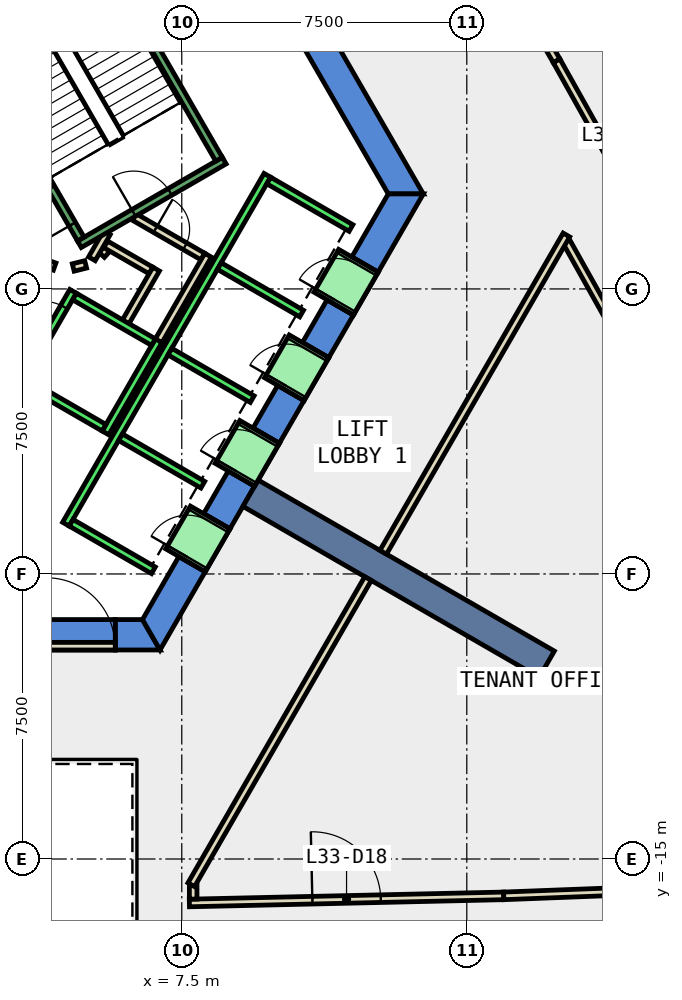
"""IFC4 building model, lengths in metres.
Left out: names, types, materials, properties, quantities, classifications, styles, units other than length and angle.
Written with IfcOpenShell. Run it as: python <this file> out.ifc"""

import sys

from ifc_helpers import new_model, si_unit, direction, frame, frame_2d, origin, place, context, subcontext, project, spatial, polyline, rectangle, outline, extrude, element, fill, save


model = new_model("IFC4")
c1 = context("Model", 3, precision=1e-05, world=origin(), true_north=direction((0.0, 1.0)))
c2 = subcontext(c1, "Body", "Model", "MODEL_VIEW")
j1 = project(units=[si_unit("LENGTHUNIT", "METRE"), si_unit("PLANEANGLEUNIT", "RADIAN")], contexts=[c1])
p1 = place(None, origin())
s1 = spatial("IfcSite", under=j1, at=p1, CompositionType="ELEMENT")
p2 = place(p1, origin())
s2 = spatial("IfcBuilding", under=s1, at=p2, CompositionType="ELEMENT")
p3 = place(p2, frame((0.0, 0.0, 150.8)))
s3 = spatial("IfcBuildingStorey", under=s2, at=p3, CompositionType="ELEMENT", Elevation=150.8)
p4 = place(p3, frame((0.0, 0.0, -0.4)))
e1 = element("IfcWall", 1, at=p4, inside=s3, PredefinedType="SHEAR", context=c2, shape_type="SweptSolid", body=[
    extrude(outline(polyline([(8.517, 11.748), (7.824, 11.348), (12.933, 2.5), (13.856, 2.5), (8.517, 11.748)])), origin(), (0.0, 0.0, 1.0), 4.2),
])
p5 = place(p3, frame((0.0, 0.0, -0.4)))
e2 = element("IfcWall", 2, at=p5, inside=s3, PredefinedType="SHEAR", context=c2, shape_type="SweptSolid", body=[
    extrude(outline(polyline([(5.75, -8.7), (5.75, -9.5), (6.928, -9.5), (6.466, -8.7), (5.75, -8.7)])), origin(), (0.0, 0.0, 1.0), 4.2),
])
p6 = place(p3, frame((0.0, 0.0, 3.6)))
e3 = element("IfcWall", 3, at=p6, inside=s3, PredefinedType="SHEAR", context=c2, shape_type="SweptSolid", body=[
    extrude(outline(polyline([(5.75, -9.5), (5.75, -8.7), (3.75, -8.7), (3.75, -9.5), (5.75, -9.5)])), origin(), (0.0, 0.0, 1.0), 0.2),
])
p7 = place(p3, frame((0.0, 0.0, -0.4)))
e4 = element("IfcWall", 4, at=p7, inside=s3, PredefinedType="SHEAR", context=c2, shape_type="SweptSolid", body=[
    extrude(outline(polyline([(8.117, -7.44), (7.424, -7.04), (6.466, -8.7), (6.928, -9.5), (8.117, -7.44)])), origin(), (0.0, 0.0, 1.0), 4.2),
])
p8 = place(p3, frame((0.0, 0.0, -0.4)))
e5 = element("IfcWall", 5, at=p8, inside=s3, PredefinedType="SHEAR", context=c2, shape_type="SweptSolid", body=[
    extrude(outline(polyline([(9.417, -5.189), (8.724, -4.789), (8.075, -5.914), (8.767, -6.314), (9.417, -5.189)])), origin(), (0.0, 0.0, 1.0), 4.2),
])
p9 = place(p3, frame((0.0, 0.0, -0.4)))
e6 = element("IfcWall", 6, at=p9, inside=s3, PredefinedType="SHEAR", context=c2, shape_type="SweptSolid", body=[
    extrude(outline(polyline([(10.717, -2.937), (10.025, -2.537), (9.374, -3.663), (10.067, -4.063), (10.717, -2.937)])), origin(), (0.0, 0.0, 1.0), 4.2),
])
p10 = place(p3, frame((0.0, 0.0, -0.4)))
e7 = element("IfcWall", 7, at=p10, inside=s3, PredefinedType="SHEAR", context=c2, shape_type="SweptSolid", body=[
    extrude(outline(polyline([(12.017, -0.686), (11.324, -0.286), (10.675, -1.411), (11.367, -1.811), (12.017, -0.686)])), origin(), (0.0, 0.0, 1.0), 4.2),
])
p11 = place(p3, frame((0.0, 0.0, -0.4)))
e8 = element("IfcWall", 8, at=p11, inside=s3, PredefinedType="SHEAR", context=c2, shape_type="SweptSolid", body=[
    extrude(outline(polyline([(11.974, 0.84), (12.667, 0.44), (13.856, 2.5), (12.933, 2.5), (11.974, 0.84)])), origin(), (0.0, 0.0, 1.0), 4.2),
])
p12 = place(p3, frame((0.0, 0.0, 3.6)))
e9 = element("IfcWall", 9, at=p12, inside=s3, PredefinedType="SHEAR", context=c2, shape_type="SweptSolid", body=[
    extrude(outline(polyline([(8.767, -6.314), (8.075, -5.914), (7.424, -7.04), (8.117, -7.44), (8.767, -6.314)])), origin(), (0.0, 0.0, 1.0), 0.2),
])
p13 = place(p3, frame((0.0, 0.0, 3.6)))
e10 = element("IfcWall", 10, at=p13, inside=s3, PredefinedType="SHEAR", context=c2, shape_type="SweptSolid", body=[
    extrude(outline(polyline([(10.067, -4.063), (9.374, -3.663), (8.724, -4.789), (9.417, -5.189), (10.067, -4.063)])), origin(), (0.0, 0.0, 1.0), 0.2),
])
p14 = place(p3, frame((0.0, 0.0, 3.6)))
e11 = element("IfcWall", 11, at=p14, inside=s3, PredefinedType="SHEAR", context=c2, shape_type="SweptSolid", body=[
    extrude(outline(polyline([(11.367, -1.811), (10.675, -1.411), (10.025, -2.537), (10.717, -2.937), (11.367, -1.811)])), origin(), (0.0, 0.0, 1.0), 0.2),
])
p15 = place(p3, frame((0.0, 0.0, 3.6)))
e12 = element("IfcWall", 12, at=p15, inside=s3, PredefinedType="SHEAR", context=c2, shape_type="SweptSolid", body=[
    extrude(outline(polyline([(12.667, 0.44), (11.974, 0.84), (11.324, -0.286), (12.017, -0.686), (12.667, 0.44)])), origin(), (0.0, 0.0, 1.0), 0.2),
])
p16 = place(p3, frame((9.31, -5.375, -0.4), z_axis=(0.0, 0.0, 1.0), x_axis=(0.866017533419, -0.500013631625, 0.0)))
e13 = element("IfcWall", 13, at=p16, inside=s3, PredefinedType="SHEAR", context=c2, shape_type="SweptSolid", body=[
    extrude(rectangle(XDim=9.0, YDim=0.8, at=frame_2d((4.5, 0.0))), origin(), (0.0, 0.0, 1.0), 4.2),
])
p17 = place(p3, frame((7.7, -16.157, 0.0), z_axis=(0.0, 0.0, 1.0), x_axis=(0.999744539931, 0.022602098978, 0.0)))
e14 = element("IfcWall", 14, at=p17, inside=s3, PredefinedType="PARTITIONING", context=c2, shape_type="SweptSolid", body=[
    extrude(rectangle(XDim=8.274, YDim=0.2, at=frame_2d((4.137, 0.0))), origin(), (0.0, 0.0, 1.0), 3.8),
])
p18 = place(p17, frame((3.237, 0.0, 0.0)))
e15 = element("IfcOpeningElement", 15, at=p18, cuts=e14, PredefinedType="OPENING", context=c2, shape_type="SweptSolid", body=[
    extrude(rectangle(XDim=1.8, YDim=2.1, at=frame_2d((0.9, 1.05))), frame((0.0, 0.11, 0.0), z_axis=(0.0, -1.0, 0.0), x_axis=(1.0, 0.0, 0.0)), (0.0, 0.0, 1.0), 0.22),
])
p19 = place(p3, frame((15.972, -15.97, 0.0), z_axis=(0.0, 0.0, 1.0), x_axis=(0.999262695969, 0.038393546916, 0.0)))
e16 = element("IfcWall", 16, at=p19, inside=s3, PredefinedType="PARTITIONING", context=c2, shape_type="SweptSolid", body=[
    extrude(rectangle(XDim=7.344, YDim=0.2, at=frame_2d((3.672, 0.0))), origin(), (0.0, 0.0, 1.0), 3.8),
])
p20 = place(p3, frame((18.93, -1.095, 0.0), z_axis=(0.0, 0.0, 1.0), x_axis=(-0.488268004118, 0.872693735599, 0.0)))
e17 = element("IfcWall", 17, at=p20, inside=s3, PredefinedType="PARTITIONING", context=c2, shape_type="SweptSolid", body=[
    extrude(rectangle(XDim=2.683, YDim=0.2, at=frame_2d((1.341, 0.0))), origin(), (0.0, 0.0, 1.0), 3.8),
])
p21 = place(p3, frame((15.659, 8.954, 0.0), z_axis=(0.0, 0.0, 1.0), x_axis=(0.50001992892, -0.866013897511, 0.0)))
e18 = element("IfcWall", 18, at=p21, inside=s3, PredefinedType="PARTITIONING", context=c2, shape_type="SweptSolid", body=[
    extrude(rectangle(XDim=3.41, YDim=0.2, at=frame_2d((1.705, 0.0))), origin(), (0.0, 0.0, 1.0), 3.8),
])
p22 = place(p3, frame((17.364, 6.001, 0.0), z_axis=(0.0, 0.0, 1.0), x_axis=(0.488528981592, -0.872547668695, 0.0)))
e19 = element("IfcWall", 19, at=p22, inside=s3, PredefinedType="PARTITIONING", context=c2, shape_type="SweptSolid", body=[
    extrude(rectangle(XDim=6.896, YDim=0.2, at=frame_2d((3.448, 0.0))), origin(), (0.0, 0.0, 1.0), 3.8),
])
p23 = place(p22, frame((3.023, 0.0, 0.0)))
e20 = element("IfcOpeningElement", 20, at=p23, cuts=e19, PredefinedType="OPENING", context=c2, shape_type="SweptSolid", body=[
    extrude(rectangle(XDim=1.0, YDim=2.1, at=frame_2d((0.5, 1.05))), frame((0.0, 0.11, 0.0), z_axis=(0.0, -1.0, 0.0), x_axis=(1.0, 0.0, 0.0)), (0.0, 0.0, 1.0), 0.22),
])
p24 = place(p3, frame((5.39, 0.898, 0.0), z_axis=(0.0, 0.0, 1.0), x_axis=(0.673828488714, 0.738887791073, 0.0)))
e21 = element("IfcWall", 21, at=p24, inside=s3, PredefinedType="PARTITIONING", context=c2, shape_type="SweptSolid", body=[
    extrude(rectangle(XDim=0.263, YDim=0.2, at=frame_2d((0.131, 0.0))), origin(), (0.0, 0.0, 1.0), 3.8),
])
p25 = place(p3, frame((5.499, 1.172, 0.0), z_axis=(0.0, 0.0, 1.0), x_axis=(0.866333505267, -0.499465972466, 0.0)))
e22 = element("IfcWall", 22, at=p25, inside=s3, PredefinedType="PARTITIONING", context=c2, shape_type="SweptSolid", body=[
    extrude(rectangle(XDim=1.374, YDim=0.2, at=frame_2d((0.687, 0.0))), origin(), (0.0, 0.0, 1.0), 3.8),
])
p26 = place(p3, frame((6.826, 0.522, 0.0), z_axis=(0.0, 0.0, 1.0), x_axis=(-0.500016722714, -0.866015748706, 0.0)))
e23 = element("IfcWall", 23, at=p26, inside=s3, PredefinedType="PARTITIONING", context=c2, shape_type="SweptSolid", body=[
    extrude(rectangle(XDim=1.7, YDim=0.2, at=frame_2d((0.85, 0.0))), origin(), (0.0, 0.0, 1.0), 3.8),
])
p27 = place(p3, frame((6.25, 1.894, 0.0), z_axis=(0.0, 0.0, 1.0), x_axis=(0.866043184279, -0.499969202016, 0.0)))
e24 = element("IfcWall", 24, at=p27, inside=s3, PredefinedType="PARTITIONING", context=c2, shape_type="SweptSolid", body=[
    extrude(rectangle(XDim=2.084, YDim=0.2, at=frame_2d((1.042, 0.0))), origin(), (0.0, 0.0, 1.0), 3.8),
])
p28 = place(p27, frame((0.642, 0.0, 0.0)))
e25 = element("IfcOpeningElement", 25, at=p28, cuts=e24, PredefinedType="OPENING", context=c2, shape_type="SweptSolid", body=[
    extrude(rectangle(XDim=0.9, YDim=2.1, at=frame_2d((0.45, 1.05))), frame((0.0, 0.11, 0.0), z_axis=(0.0, -1.0, 0.0), x_axis=(1.0, 0.0, 0.0)), (0.0, 0.0, 1.0), 0.22),
])
p29 = place(p3, frame((8.192, 0.888, 0.0), z_axis=(0.0, 0.0, 1.0), x_axis=(-0.499940625693, -0.866059680843, 0.0)))
e26 = element("IfcWall", 26, at=p29, inside=s3, PredefinedType="PARTITIONING", context=c2, shape_type="SweptSolid", body=[
    extrude(rectangle(XDim=2.68, YDim=0.2, at=frame_2d((1.34, 0.0))), origin(), (0.0, 0.0, 1.0), 3.8),
])
p30 = place(p3, frame((5.135, 0.793, 0.0), z_axis=(0.0, 0.0, 1.0), x_axis=(0.499526442893, 0.866298639529, 0.0)))
e27 = element("IfcWall", 27, at=p30, inside=s3, PredefinedType="PARTITIONING", context=c2, shape_type="SweptSolid", body=[
    extrude(rectangle(XDim=0.791, YDim=0.2, at=frame_2d((0.396, 0.0))), origin(), (0.0, 0.0, 1.0), 3.8),
])
p31 = place(p3, frame((3.838, 0.702, 0.0), z_axis=(0.0, 0.0, 1.0), x_axis=(0.941035081519, -0.338308993895, 0.0)))
e28 = element("IfcWall", 28, at=p31, inside=s3, PredefinedType="PARTITIONING", context=c2, shape_type="SweptSolid", body=[
    extrude(rectangle(XDim=0.337, YDim=0.2, at=frame_2d((0.168, 0.0))), origin(), (0.0, 0.0, 1.0), 3.8),
])
p32 = place(p3, frame((4.644, 0.564, 0.0), z_axis=(0.0, 0.0, 1.0), x_axis=(0.969929076366, 0.243387729394, 0.0)))
e29 = element("IfcWall", 29, at=p32, inside=s3, PredefinedType="PARTITIONING", context=c2, shape_type="SweptSolid", body=[
    extrude(rectangle(XDim=0.337, YDim=0.2, at=frame_2d((0.168, 0.0))), origin(), (0.0, 0.0, 1.0), 3.8),
])
p33 = place(p3, frame((7.8, -15.69, 0.0), z_axis=(0.0, 0.0, 1.0), x_axis=(0.0, -1.0, 0.0)))
e30 = element("IfcWall", 30, at=p33, inside=s3, PredefinedType="PARTITIONING", context=c2, shape_type="SweptSolid", body=[
    extrude(rectangle(XDim=0.365, YDim=0.2, at=frame_2d((0.183, 0.0))), origin(), (0.0, 0.0, 1.0), 3.8),
])
p34 = place(p3, frame((17.621, 1.42, 0.0), z_axis=(0.0, 0.0, 1.0), x_axis=(-0.499987708133, -0.866032500381, 0.0)))
e31 = element("IfcWall", 31, at=p34, inside=s3, PredefinedType="PARTITIONING", context=c2, shape_type="SweptSolid", body=[
    extrude(rectangle(XDim=9.64, YDim=0.2, at=frame_2d((4.82, 0.0))), origin(), (0.0, 0.0, 1.0), 3.8),
])
p35 = place(p3, frame((3.75, -9.4, 0.0), z_axis=(0.0, 0.0, 1.0), x_axis=(1.0, 0.0, 0.0)))
e32 = element("IfcWall", 32, at=p35, inside=s3, PredefinedType="PARTITIONING", context=c2, shape_type="SweptSolid", body=[
    extrude(rectangle(XDim=2.0, YDim=0.2, at=frame_2d((1.0, 0.0))), origin(), (0.0, 0.0, 1.0), 2.4),
])
p36 = place(p35, frame((0.19, 0.0, 0.0)))
e33 = element("IfcOpeningElement", 33, at=p36, cuts=e32, PredefinedType="OPENING", context=c2, shape_type="SweptSolid", body=[
    extrude(rectangle(XDim=1.8, YDim=2.1, at=frame_2d((0.9, 1.05))), frame((0.0, 0.11, 0.0), z_axis=(0.0, -1.0, 0.0), x_axis=(1.0, 0.0, 0.0)), (0.0, 0.0, 1.0), 0.22),
])
p37 = place(p3, frame((12.401, -7.621, 0.0), z_axis=(0.0, 0.0, 1.0), x_axis=(-0.499983724212, -0.866034800411, 0.0)))
e34 = element("IfcWall", 34, at=p37, inside=s3, PredefinedType="PARTITIONING", context=c2, shape_type="SweptSolid", body=[
    extrude(rectangle(XDim=9.302, YDim=0.2, at=frame_2d((4.651, 0.0))), origin(), (0.0, 0.0, 1.0), 3.8),
])
p38 = place(p3, frame((3.24, -2.488, 0.0), z_axis=(0.0, 0.0, 1.0), x_axis=(0.49994636267, 0.866056369097, 0.0)))
e35 = element("IfcWall", 35, at=p38, inside=s3, PredefinedType="STANDARD", context=c2, shape_type="SweptSolid", body=[
    extrude(rectangle(XDim=2.8, YDim=0.2, at=frame_2d((1.4, 0.0))), origin(), (0.0, 0.0, 1.0), 3.8),
])
p39 = place(p38, frame((1.225, 0.0, 0.0)))
e36 = element("IfcOpeningElement", 36, at=p39, cuts=e35, PredefinedType="OPENING", context=c2, shape_type="SweptSolid", body=[
    extrude(rectangle(XDim=1.1, YDim=2.1, at=frame_2d((0.55, 1.05))), frame((0.0, 0.11, 0.0), z_axis=(0.0, -1.0, 0.0), x_axis=(1.0, 0.0, 0.0)), (0.0, 0.0, 1.0), 0.22),
])
p40 = place(p3, frame((5.492, -3.788, 0.0), z_axis=(0.0, 0.0, 1.0), x_axis=(0.500011755427, 0.866018616679, 0.0)))
e37 = element("IfcWall", 37, at=p40, inside=s3, PredefinedType="STANDARD", context=c2, shape_type="SweptSolid", body=[
    extrude(rectangle(XDim=2.8, YDim=0.2, at=frame_2d((1.4, 0.0))), origin(), (0.0, 0.0, 1.0), 3.8),
])
p41 = place(p3, frame((3.377, -2.452, 0.0), z_axis=(0.0, 0.0, 1.0), x_axis=(0.865955154139, -0.50012165622, 0.0)))
e38 = element("IfcWall", 38, at=p41, inside=s3, PredefinedType="STANDARD", context=c2, shape_type="SweptSolid", body=[
    extrude(rectangle(XDim=2.4, YDim=0.2, at=frame_2d((1.2, 0.0))), origin(), (0.0, 0.0, 1.0), 3.8),
])
p42 = place(p3, frame((4.677, -0.2, 0.0), z_axis=(0.0, 0.0, 1.0), x_axis=(0.865973769406, -0.500089422704, 0.0)))
e39 = element("IfcWall", 39, at=p42, inside=s3, PredefinedType="STANDARD", context=c2, shape_type="SweptSolid", body=[
    extrude(rectangle(XDim=2.399, YDim=0.2, at=frame_2d((1.2, 0.0))), origin(), (0.0, 0.0, 1.0), 3.8),
])
p43 = place(p3, frame((4.451, -6.19, 0.0), z_axis=(0.0, 0.0, 1.0), x_axis=(0.50000090737, 0.866024879913, 0.0)))
e40 = element("IfcWall", 40, at=p43, inside=s3, PredefinedType="STANDARD", context=c2, shape_type="SweptSolid", body=[
    extrude(rectangle(XDim=10.6, YDim=0.2, at=frame_2d((5.3, 0.0))), origin(), (0.0, 0.0, 1.0), 3.8),
])
for number, where, z_axis, x_axis in (
    (41, (4.588, -6.153, 0.0), (0.0, 0.0, 1.0), (0.866, -0.5, 0.0)),
    (42, (5.888, -3.902, 0.0), (0.0, 0.0, 1.0), (0.866, -0.5, 0.0)),
    (43, (7.188, -1.65, 0.0), (0.0, 0.0, 1.0), (0.866, -0.5, 0.0)),
    (44, (8.488, 0.602, 0.0), (0.0, 0.0, 1.0), (0.866, -0.5, 0.0)),
):
    element("IfcWall", number, at=place(p3, frame(where, z_axis=z_axis, x_axis=x_axis)), inside=s3, PredefinedType="STANDARD", context=c2, shape_type="SweptSolid", body=[
        extrude(rectangle(XDim=2.5, YDim=0.2, at=frame_2d((1.25, 0.0))), origin(), (0.0, 0.0, 1.0), 3.8),
    ])
p44 = place(p3, frame((9.788, 2.853, 0.0), z_axis=(0.0, 0.0, 1.0), x_axis=(0.865998541277, -0.500046524342, 0.0)))
e45 = element("IfcWall", 45, at=p44, inside=s3, PredefinedType="STANDARD", context=c2, shape_type="SweptSolid", body=[
    extrude(rectangle(XDim=2.5, YDim=0.2, at=frame_2d((1.25, 0.0))), origin(), (0.0, 0.0, 1.0), 3.8),
])
p45 = place(p3, frame((7.598, -7.14, 0.0), z_axis=(0.0, 0.0, 1.0), x_axis=(0.500362116554, 0.865816234728, 0.0)))
e46 = element("IfcWall", 46, at=p45, inside=s3, PredefinedType="STANDARD", context=c2, shape_type="SweptSolid", body=[
    extrude(rectangle(XDim=1.299, YDim=1.2, at=frame_2d((0.65, 0.0))), origin(), (0.0, 0.0, 1.0), 2.4),
])
p46 = place(p45, frame((0.1, 0.0, 0.0)))
e47 = element("IfcOpeningElement", 47, at=p46, cuts=e46, PredefinedType="OPENING", context=c2, shape_type="SweptSolid", body=[
    extrude(rectangle(XDim=1.1, YDim=2.3, at=frame_2d((0.55, 1.15))), frame((0.0, 0.61, 0.0), z_axis=(0.0, -1.0, 0.0), x_axis=(1.0, 0.0, 0.0)), (0.0, 0.0, 1.0), 1.22),
])
p47 = place(p3, frame((8.898, -4.889, 0.0), z_axis=(0.0, 0.0, 1.0), x_axis=(0.500036693733, 0.866004217611, 0.0)))
e48 = element("IfcWall", 48, at=p47, inside=s3, PredefinedType="STANDARD", context=c2, shape_type="SweptSolid", body=[
    extrude(rectangle(XDim=1.3, YDim=1.2, at=frame_2d((0.65, 0.0))), origin(), (0.0, 0.0, 1.0), 2.4),
])
p48 = place(p47, frame((0.1, 0.0, 0.0)))
e49 = element("IfcOpeningElement", 49, at=p48, cuts=e48, PredefinedType="OPENING", context=c2, shape_type="SweptSolid", body=[
    extrude(rectangle(XDim=1.1, YDim=2.3, at=frame_2d((0.55, 1.15))), frame((0.0, 0.61, 0.0), z_axis=(0.0, -1.0, 0.0), x_axis=(1.0, 0.0, 0.0)), (0.0, 0.0, 1.0), 1.22),
])
p49 = place(p3, frame((10.198, -2.637, 0.0), z_axis=(0.0, 0.0, 1.0), x_axis=(0.49989585183, 0.866085525409, 0.0)))
e50 = element("IfcWall", 50, at=p49, inside=s3, PredefinedType="STANDARD", context=c2, shape_type="SweptSolid", body=[
    extrude(rectangle(XDim=1.3, YDim=1.2, at=frame_2d((0.65, 0.0))), origin(), (0.0, 0.0, 1.0), 2.4),
])
p50 = place(p49, frame((0.1, 0.0, 0.0)))
e51 = element("IfcOpeningElement", 51, at=p50, cuts=e50, PredefinedType="OPENING", context=c2, shape_type="SweptSolid", body=[
    extrude(rectangle(XDim=1.1, YDim=2.3, at=frame_2d((0.55, 1.15))), frame((0.0, 0.61, 0.0), z_axis=(0.0, -1.0, 0.0), x_axis=(1.0, 0.0, 0.0)), (0.0, 0.0, 1.0), 1.22),
])
p51 = place(p3, frame((11.498, -0.385, 0.0), z_axis=(0.0, 0.0, 1.0), x_axis=(0.500221244143, 0.865897630733, 0.0)))
e52 = element("IfcWall", 52, at=p51, inside=s3, PredefinedType="STANDARD", context=c2, shape_type="SweptSolid", body=[
    extrude(rectangle(XDim=1.299, YDim=1.2, at=frame_2d((0.65, 0.0))), origin(), (0.0, 0.0, 1.0), 2.4),
])
p52 = place(p51, frame((0.1, 0.0, 0.0)))
e53 = element("IfcOpeningElement", 53, at=p52, cuts=e52, PredefinedType="OPENING", context=c2, shape_type="SweptSolid", body=[
    extrude(rectangle(XDim=1.1, YDim=2.3, at=frame_2d((0.55, 1.15))), frame((0.0, 0.61, 0.0), z_axis=(0.0, -1.0, 0.0), x_axis=(1.0, 0.0, 0.0)), (0.0, 0.0, 1.0), 1.22),
])
p53 = place(p3, frame((4.806, 1.176, 0.0), z_axis=(0.0, 0.0, 1.0), x_axis=(0.866059941101, 0.499940174841, 0.0)))
e54 = element("IfcWall", 54, at=p53, inside=s3, PredefinedType="STANDARD", context=c2, shape_type="SweptSolid", body=[
    extrude(rectangle(XDim=4.4, YDim=0.2, at=frame_2d((2.2, 0.0))), origin(), (0.0, 0.0, 1.0), 3.8),
])
p54 = place(p53, frame((1.65, 0.0, 0.0)))
e55 = element("IfcOpeningElement", 55, at=p54, cuts=e54, PredefinedType="OPENING", context=c2, shape_type="SweptSolid", body=[
    extrude(rectangle(XDim=1.1, YDim=2.2, at=frame_2d((0.55, 1.1))), frame((0.0, 0.11, 0.0), z_axis=(0.0, -1.0, 0.0), x_axis=(1.0, 0.0, 0.0)), (0.0, 0.0, 1.0), 0.22),
])
p55 = place(p3, frame((4.843, 1.312, 0.0), z_axis=(0.0, 0.0, 1.0), x_axis=(-0.499963383562, 0.866046543262, 0.0)))
e56 = element("IfcWall", 56, at=p55, inside=s3, PredefinedType="STANDARD", context=c2, shape_type="SweptSolid", body=[
    extrude(rectangle(XDim=6.9, YDim=0.2, at=frame_2d((3.45, 0.0))), origin(), (0.0, 0.0, 1.0), 3.8),
])
p56 = place(p55, frame((0.45, 0.0, 0.0)))
e57 = element("IfcOpeningElement", 57, at=p56, cuts=e56, PredefinedType="OPENING", context=c2, shape_type="SweptSolid", body=[
    extrude(rectangle(XDim=1.1, YDim=2.2, at=frame_2d((0.55, 1.1))), frame((0.0, 0.11, 0.0), z_axis=(0.0, -1.0, 0.0), x_axis=(1.0, 0.0, 0.0)), (0.0, 0.0, 1.0), 0.22),
])
p57 = place(p3, frame((8.48, 3.412, 0.0), z_axis=(0.0, 0.0, 1.0), x_axis=(-0.499978703459, 0.866037698999, 0.0)))
e58 = element("IfcWall", 58, at=p57, inside=s3, PredefinedType="STANDARD", context=c2, shape_type="SweptSolid", body=[
    extrude(rectangle(XDim=6.9, YDim=0.2, at=frame_2d((3.45, 0.0))), origin(), (0.0, 0.0, 1.0), 3.8),
])
p58 = place(p18, origin())
e59 = element("IfcDoor", 59, at=p58, inside=s3, OperationType="DOUBLE_DOOR_SINGLE_SWING", PredefinedType="DOOR", context=c2, shape_type="SweptSolid", body=[
    extrude(rectangle(XDim=1.8, YDim=2.1, at=frame_2d((0.9, 1.05))), frame((0.0, 0.025, 0.0), z_axis=(0.0, -1.0, 0.0), x_axis=(1.0, 0.0, 0.0)), (0.0, 0.0, 1.0), 0.05),
])
fill(e15, e59)
p59 = place(p28, origin())
e60 = element("IfcDoor", 60, at=p59, inside=s3, OperationType="SINGLE_SWING_LEFT", PredefinedType="DOOR", context=c2, shape_type="SweptSolid", body=[
    extrude(rectangle(XDim=0.9, YDim=2.1, at=frame_2d((0.45, 1.05))), frame((0.0, 0.025, 0.0), z_axis=(0.0, -1.0, 0.0), x_axis=(1.0, 0.0, 0.0)), (0.0, 0.0, 1.0), 0.05),
])
fill(e25, e60)
p60 = place(p36, origin())
e61 = element("IfcDoor", 61, at=p60, inside=s3, OperationType="DOUBLE_DOOR_SINGLE_SWING", PredefinedType="DOOR", context=c2, shape_type="SweptSolid", body=[
    extrude(rectangle(XDim=1.8, YDim=2.1, at=frame_2d((0.9, 1.05))), frame((0.0, 0.025, 0.0), z_axis=(0.0, -1.0, 0.0), x_axis=(1.0, 0.0, 0.0)), (0.0, 0.0, 1.0), 0.05),
])
fill(e33, e61)
p61 = place(p46, origin())
e62 = element("IfcDoor", 62, at=p61, inside=s3, OperationType="SLIDING_TO_LEFT", PredefinedType="DOOR", context=c2, shape_type="SweptSolid", body=[
    extrude(rectangle(XDim=1.1, YDim=2.3, at=frame_2d((0.55, 1.15))), frame((0.0, 0.025, 0.0), z_axis=(0.0, -1.0, 0.0), x_axis=(1.0, 0.0, 0.0)), (0.0, 0.0, 1.0), 0.05),
])
fill(e47, e62)
p62 = place(p48, origin())
e63 = element("IfcDoor", 63, at=p62, inside=s3, OperationType="SLIDING_TO_LEFT", PredefinedType="DOOR", context=c2, shape_type="SweptSolid", body=[
    extrude(rectangle(XDim=1.1, YDim=2.3, at=frame_2d((0.55, 1.15))), frame((0.0, 0.025, 0.0), z_axis=(0.0, -1.0, 0.0), x_axis=(1.0, 0.0, 0.0)), (0.0, 0.0, 1.0), 0.05),
])
fill(e49, e63)
p63 = place(p50, origin())
e64 = element("IfcDoor", 64, at=p63, inside=s3, OperationType="SLIDING_TO_LEFT", PredefinedType="DOOR", context=c2, shape_type="SweptSolid", body=[
    extrude(rectangle(XDim=1.1, YDim=2.3, at=frame_2d((0.55, 1.15))), frame((0.0, 0.025, 0.0), z_axis=(0.0, -1.0, 0.0), x_axis=(1.0, 0.0, 0.0)), (0.0, 0.0, 1.0), 0.05),
])
fill(e51, e64)
p64 = place(p52, origin())
e65 = element("IfcDoor", 65, at=p64, inside=s3, OperationType="SLIDING_TO_LEFT", PredefinedType="DOOR", context=c2, shape_type="SweptSolid", body=[
    extrude(rectangle(XDim=1.1, YDim=2.3, at=frame_2d((0.55, 1.15))), frame((0.0, 0.025, 0.0), z_axis=(0.0, -1.0, 0.0), x_axis=(1.0, 0.0, 0.0)), (0.0, 0.0, 1.0), 0.05),
])
fill(e53, e65)
p65 = place(p39, origin())
e66 = element("IfcDoor", 66, at=p65, inside=s3, OperationType="SLIDING_TO_LEFT", PredefinedType="DOOR", context=c2, shape_type="SweptSolid", body=[
    extrude(rectangle(XDim=1.1, YDim=2.1, at=frame_2d((0.55, 1.05))), frame((0.0, 0.025, 0.0), z_axis=(0.0, -1.0, 0.0), x_axis=(1.0, 0.0, 0.0)), (0.0, 0.0, 1.0), 0.05),
])
fill(e36, e66)
p66 = place(p56, origin())
e67 = element("IfcDoor", 67, at=p66, inside=s3, OperationType="SINGLE_SWING_LEFT", PredefinedType="DOOR", context=c2, shape_type="SweptSolid", body=[
    extrude(rectangle(XDim=1.1, YDim=2.2, at=frame_2d((0.55, 1.1))), frame((0.0, 0.025, 0.0), z_axis=(0.0, -1.0, 0.0), x_axis=(1.0, 0.0, 0.0)), (0.0, 0.0, 1.0), 0.05),
])
fill(e57, e67)
p67 = place(p54, origin())
e68 = element("IfcDoor", 68, at=p67, inside=s3, OperationType="SINGLE_SWING_LEFT", PredefinedType="DOOR", context=c2, shape_type="SweptSolid", body=[
    extrude(rectangle(XDim=1.1, YDim=2.2, at=frame_2d((0.55, 1.1))), frame((0.0, 0.025, 0.0), z_axis=(0.0, -1.0, 0.0), x_axis=(1.0, 0.0, 0.0)), (0.0, 0.0, 1.0), 0.05),
])
fill(e55, e68)
save(model, sys.argv[1])
